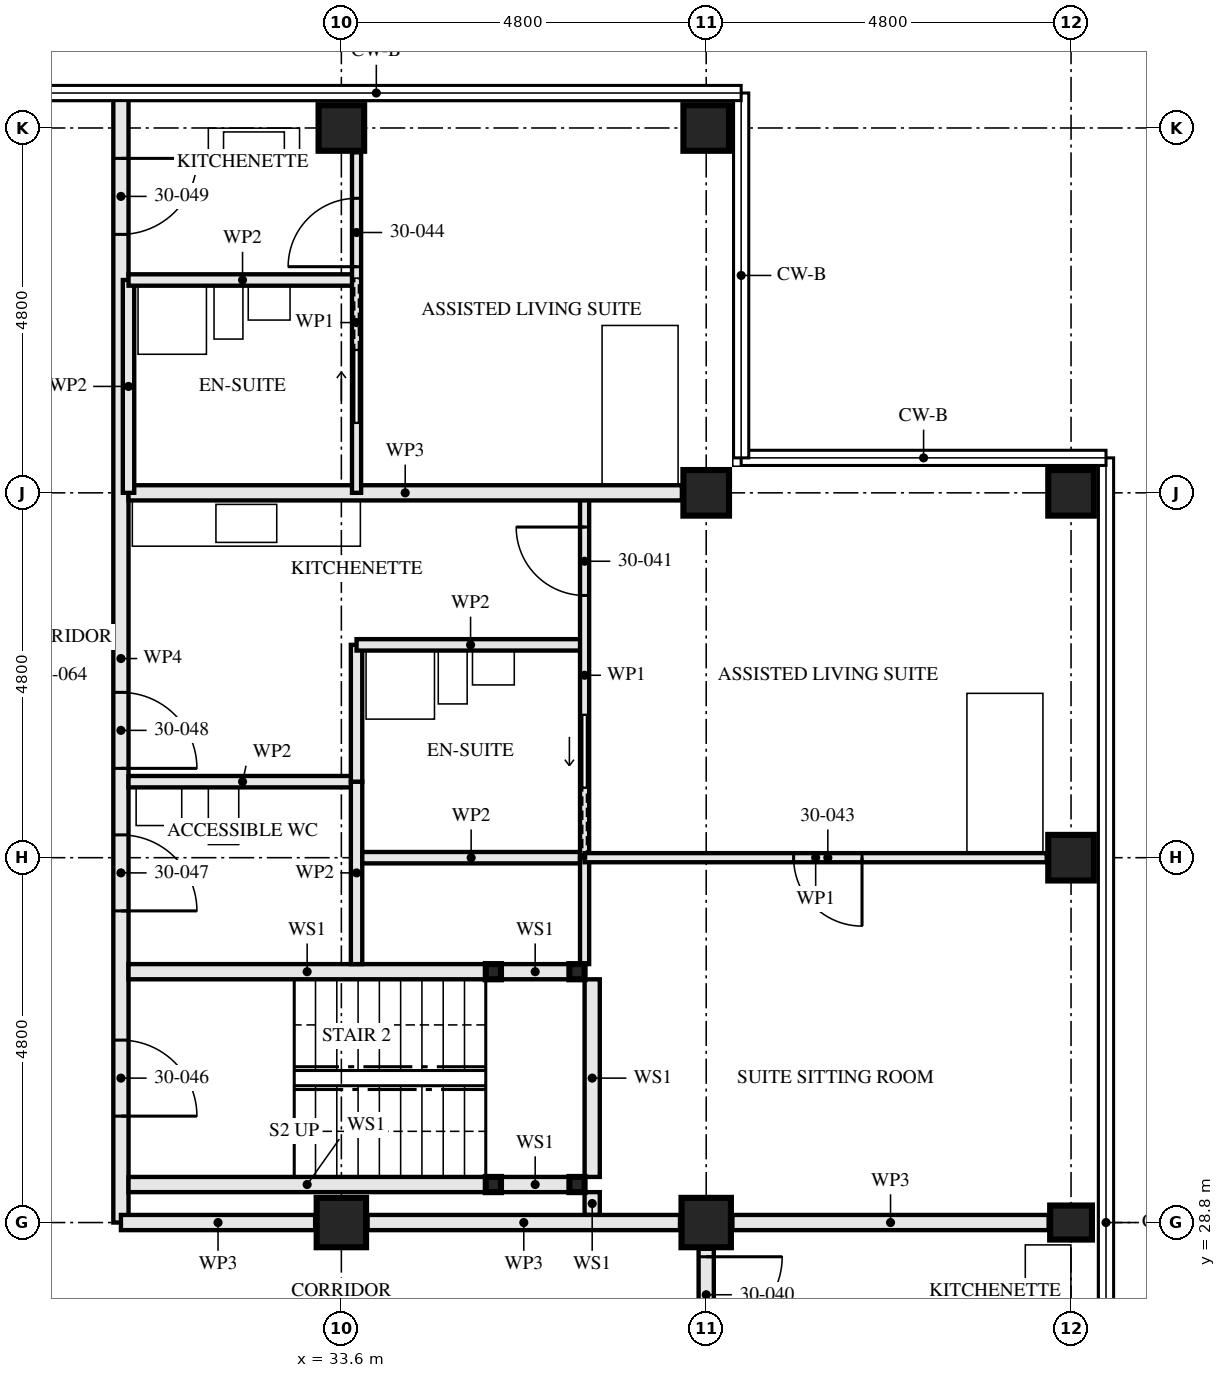
"""IFC4 building model, lengths in metres.
Left out: names, types, materials, properties, quantities, classifications, styles, units other than length and angle.
Written with IfcOpenShell. Run it as: python <this file> out.ifc"""

import sys

from ifc_helpers import new_model, si_unit, direction, frame, frame_2d, origin, origin_2d, place, context, subcontext, project, spatial, rectangle, hollow_rectangle, i_section, extrude, element, fill, save


model = new_model("IFC4")
c1 = context("Model", 3, precision=1e-05, world=origin(), true_north=direction((0.0, 1.0)))
c2 = subcontext(c1, "Body", "Model", "MODEL_VIEW")
j1 = project(units=[si_unit("LENGTHUNIT", "METRE"), si_unit("PLANEANGLEUNIT", "RADIAN")], contexts=[c1])
p1 = place(None, origin())
s1 = spatial("IfcSite", under=j1, at=p1, CompositionType="ELEMENT")
p2 = place(p1, origin())
s2 = spatial("IfcBuilding", under=s1, at=p2, CompositionType="ELEMENT")
p3 = place(p2, frame((0.0, 0.0, 112.0)))
s3 = spatial("IfcBuildingStorey", under=s2, at=p3, CompositionType="ELEMENT", Elevation=112.0)
p4 = place(p3, frame((33.6, 28.8, 0.0), z_axis=(0.0, 0.0, 1.0), x_axis=(0.0, 1.0, 0.0)))
e1 = element("IfcColumn", 1, at=p4, inside=s3, PredefinedType="COLUMN", context=c2, shape_type="SweptSolid", body=[
    extrude(hollow_rectangle(XDim=0.65, YDim=0.65, WallThickness=0.05, at=origin_2d()), origin(), (0.0, 0.0, 1.0), 3.5),
])
p5 = place(p3, frame((33.6, 43.2, 0.0), z_axis=(0.0, 0.0, 1.0), x_axis=(0.0, 1.0, 0.0)))
e2 = element("IfcColumn", 2, at=p5, inside=s3, PredefinedType="COLUMN", context=c2, shape_type="SweptSolid", body=[
    extrude(hollow_rectangle(XDim=0.6, YDim=0.6, WallThickness=0.08, at=origin_2d()), origin(), (0.0, 0.0, 1.0), 3.5),
])
p6 = place(p3, frame((38.4, 28.8, 0.0), z_axis=(0.0, 0.0, 1.0), x_axis=(0.0, 1.0, 0.0)))
e3 = element("IfcColumn", 3, at=p6, inside=s3, PredefinedType="COLUMN", context=c2, shape_type="SweptSolid", body=[
    extrude(hollow_rectangle(XDim=0.65, YDim=0.65, WallThickness=0.05, at=origin_2d()), origin(), (0.0, 0.0, 1.0), 3.5),
])
for number, where, z_axis, x_axis in (
    (4, (38.4, 38.4, 0.0), (0.0, 0.0, 1.0), (0.0, 1.0, 0.0)),
    (5, (38.4, 43.2, 0.0), (0.0, 0.0, 1.0), (0.0, 1.0, 0.0)),
):
    element("IfcColumn", number, at=place(p3, frame(where, z_axis=z_axis, x_axis=x_axis)), inside=s3, PredefinedType="COLUMN", context=c2, shape_type="SweptSolid", body=[
        extrude(hollow_rectangle(XDim=0.6, YDim=0.6, WallThickness=0.08, at=origin_2d()), origin(), (0.0, 0.0, 1.0), 3.5),
    ])
p7 = place(p3, frame((43.2, 28.8, 0.0), z_axis=(0.0, 0.0, 1.0), x_axis=(0.0, 1.0, 0.0)))
e6 = element("IfcColumn", 6, at=p7, inside=s3, PredefinedType="COLUMN", context=c2, shape_type="SweptSolid", body=[
    extrude(i_section(OverallWidth=0.448, OverallDepth=0.55, WebThickness=0.072, FlangeThickness=0.115, FilletRadius=0.015, at=origin_2d()), origin(), (0.0, 0.0, 1.0), 3.5),
])
for number, where, z_axis, x_axis in (
    (7, (43.2, 33.6, 0.0), (0.0, 0.0, 1.0), (1.0, 0.0, 0.0)),
    (8, (43.2, 38.4, 0.0), (0.0, 0.0, 1.0), (0.0, 1.0, 0.0)),
):
    element("IfcColumn", number, at=place(p3, frame(where, z_axis=z_axis, x_axis=x_axis)), inside=s3, PredefinedType="COLUMN", context=c2, shape_type="SweptSolid", body=[
        extrude(hollow_rectangle(XDim=0.6, YDim=0.6, WallThickness=0.08, at=origin_2d()), origin(), (0.0, 0.0, 1.0), 3.5),
    ])
for number, where, z_axis, x_axis in (
    (9, (36.7, 29.3, 0.0), (0.0, 0.0, 1.0), (1.0, 0.0, 0.0)),
    (10, (36.7, 32.1, 0.0), (0.0, 0.0, 1.0), (1.0, 0.0, 0.0)),
    (11, (35.6, 29.3, 0.0), (0.0, 0.0, 1.0), (1.0, 0.0, 0.0)),
    (12, (35.6, 32.1, 0.0), (0.0, 0.0, 1.0), (1.0, 0.0, 0.0)),
):
    element("IfcColumn", number, at=place(p3, frame(where, z_axis=z_axis, x_axis=x_axis)), inside=s3, PredefinedType="COLUMN", context=c2, shape_type="SweptSolid", body=[
        extrude(hollow_rectangle(XDim=0.2, YDim=0.2, WallThickness=0.008, at=origin_2d()), origin(), (0.0, 0.0, 1.0), 3.33),
    ])
p8 = place(p3, frame((38.4, 26.8, 0.0), z_axis=(0.0, 0.0, 1.0), x_axis=(0.0, 1.0, 0.0)))
e13 = element("IfcWall", 13, at=p8, inside=s3, PredefinedType="PARTITIONING", context=c2, shape_type="SweptSolid", body=[
    extrude(rectangle(XDim=1.655, YDim=0.2, at=frame_2d((0.828, 0.0))), origin(), (0.0, 0.0, 1.0), 3.33),
])
p9 = place(p8, frame((0.55, 0.0, 0.0)))
e14 = element("IfcOpeningElement", 14, at=p9, cuts=e13, PredefinedType="OPENING", context=c2, shape_type="SweptSolid", body=[
    extrude(rectangle(XDim=1.0, YDim=2.1, at=frame_2d((0.5, 1.05))), frame((0.0, 0.111, 0.0), z_axis=(0.0, -1.0, 0.0), x_axis=(1.0, 0.0, 0.0)), (0.0, 0.0, 1.0), 0.221),
])
p10 = place(p3, frame((36.6, 29.3, 0.0), z_axis=(0.0, 0.0, 1.0), x_axis=(-1.0, 0.0, 0.0)))
e15 = element("IfcWall", 15, at=p10, inside=s3, PredefinedType="SOLIDWALL", context=c2, shape_type="SweptSolid", body=[
    extrude(rectangle(XDim=0.9, YDim=0.2, at=frame_2d((0.45, 0.0))), origin(), (0.0, 0.0, 1.0), 2.99),
])
p11 = place(p3, frame((35.5, 29.3, 0.0), z_axis=(0.0, 0.0, 1.0), x_axis=(-1.0, 0.0, 0.0)))
e16 = element("IfcWall", 16, at=p11, inside=s3, PredefinedType="SOLIDWALL", context=c2, shape_type="SweptSolid", body=[
    extrude(rectangle(XDim=4.7, YDim=0.2, at=frame_2d((2.35, 0.0))), origin(), (0.0, 0.0, 1.0), 2.99),
])
p12 = place(p3, frame((36.6, 32.1, 0.0), z_axis=(0.0, 0.0, 1.0), x_axis=(-1.0, 0.0, 0.0)))
e17 = element("IfcWall", 17, at=p12, inside=s3, PredefinedType="SOLIDWALL", context=c2, shape_type="SweptSolid", body=[
    extrude(rectangle(XDim=0.9, YDim=0.2, at=frame_2d((0.45, 0.0))), origin(), (0.0, 0.0, 1.0), 2.99),
])
p13 = place(p3, frame((35.5, 32.1, 0.0), z_axis=(0.0, 0.0, 1.0), x_axis=(-1.0, 0.0, 0.0)))
e18 = element("IfcWall", 18, at=p13, inside=s3, PredefinedType="SOLIDWALL", context=c2, shape_type="SweptSolid", body=[
    extrude(rectangle(XDim=4.7, YDim=0.2, at=frame_2d((2.35, 0.0))), origin(), (0.0, 0.0, 1.0), 2.99),
])
p14 = place(p3, frame((36.9, 28.9, 0.0), z_axis=(0.0, 0.0, 1.0), x_axis=(0.0, 1.0, 0.0)))
e19 = element("IfcWall", 19, at=p14, inside=s3, PredefinedType="SOLIDWALL", context=c2, shape_type="SweptSolid", body=[
    extrude(rectangle(XDim=0.3, YDim=0.2, at=frame_2d((0.15, 0.0))), origin(), (0.0, 0.0, 1.0), 3.33),
])
p15 = place(p3, frame((36.9, 29.4, 0.0), z_axis=(0.0, 0.0, 1.0), x_axis=(0.0, 1.0, 0.0)))
e20 = element("IfcWall", 20, at=p15, inside=s3, PredefinedType="SOLIDWALL", context=c2, shape_type="SweptSolid", body=[
    extrude(rectangle(XDim=2.6, YDim=0.2, at=frame_2d((1.3, 0.0))), origin(), (0.0, 0.0, 1.0), 3.33),
])
p16 = place(p3, frame((33.8, 32.2, 0.0), z_axis=(0.0, 0.0, 1.0), x_axis=(0.0, 1.0, 0.0)))
e21 = element("IfcWall", 21, at=p16, inside=s3, PredefinedType="PARTITIONING", context=c2, shape_type="SweptSolid", body=[
    extrude(rectangle(XDim=2.4, YDim=0.15, at=frame_2d((1.2, 0.0))), origin(), (0.0, 0.0, 1.0), 2.55),
])
for number, where, z_axis, x_axis in (
    (22, (33.8, 34.6, 0.0), (0.0, 0.0, 1.0), (-1.0, 0.0, 0.0)),
    (23, (36.8, 36.4, 0.0), (0.0, 0.0, 1.0), (-1.0, 0.0, 0.0)),
):
    element("IfcWall", number, at=place(p3, frame(where, z_axis=z_axis, x_axis=x_axis)), inside=s3, PredefinedType="PARTITIONING", context=c2, shape_type="SweptSolid", body=[
        extrude(rectangle(XDim=3.0, YDim=0.15, at=frame_2d((1.5, 0.0))), origin(), (0.0, 0.0, 1.0), 3.33),
    ])
p17 = place(p3, frame((33.8, 34.6, 0.0), z_axis=(0.0, 0.0, 1.0), x_axis=(0.0, 1.0, 0.0)))
e24 = element("IfcWall", 24, at=p17, inside=s3, PredefinedType="PARTITIONING", context=c2, shape_type="SweptSolid", body=[
    extrude(rectangle(XDim=1.8, YDim=0.15, at=frame_2d((0.9, 0.0))), origin(), (0.0, 0.0, 1.0), 3.33),
])
p18 = place(p3, frame((36.8, 32.2, 0.0), z_axis=(0.0, 0.0, 1.0), x_axis=(0.0, 1.0, 0.0)))
e25 = element("IfcWall", 25, at=p18, inside=s3, PredefinedType="PARTITIONING", context=c2, shape_type="SweptSolid", body=[
    extrude(rectangle(XDim=1.4, YDim=0.12, at=frame_2d((0.7, 0.0))), origin(), (0.0, 0.0, 1.0), 3.33),
])
p19 = place(p3, frame((36.8, 33.6, 0.0), z_axis=(0.0, 0.0, 1.0), x_axis=(0.0, 1.0, 0.0)))
e26 = element("IfcWall", 26, at=p19, inside=s3, PredefinedType="PARTITIONING", context=c2, shape_type="SweptSolid", body=[
    extrude(rectangle(XDim=4.8, YDim=0.12, at=frame_2d((2.4, 0.0))), origin(), (0.0, 0.0, 1.0), 3.33),
])
p20 = place(p19, frame((3.45, 0.0, 0.0)))
e27 = element("IfcOpeningElement", 27, at=p20, cuts=e26, PredefinedType="OPENING", context=c2, shape_type="SweptSolid", body=[
    extrude(rectangle(XDim=0.9, YDim=2.1, at=frame_2d((0.45, 1.05))), frame((0.0, 0.071, 0.0), z_axis=(0.0, -1.0, 0.0), x_axis=(1.0, 0.0, 0.0)), (0.0, 0.0, 1.0), 0.141),
])
p21 = place(p19, frame((0.925, 0.0, 0.0)))
e28 = element("IfcOpeningElement", 28, at=p21, cuts=e26, PredefinedType="OPENING", context=c2, shape_type="SweptSolid", body=[
    extrude(rectangle(XDim=0.95, YDim=2.1, at=frame_2d((0.475, 1.05))), frame((0.0, 0.071, 0.0), z_axis=(0.0, -1.0, 0.0), x_axis=(1.0, 0.0, 0.0)), (0.0, 0.0, 1.0), 0.141),
])
p22 = place(p3, frame((42.88, 33.6, 0.0), z_axis=(0.0, 0.0, 1.0), x_axis=(-1.0, 0.0, 0.0)))
e29 = element("IfcWall", 29, at=p22, inside=s3, PredefinedType="PARTITIONING", context=c2, shape_type="SweptSolid", body=[
    extrude(rectangle(XDim=6.08, YDim=0.12, at=frame_2d((3.04, 0.0))), origin(), (0.0, 0.0, 1.0), 2.55),
])
p23 = place(p22, frame((2.43, 0.0, 0.0)))
e30 = element("IfcOpeningElement", 30, at=p23, cuts=e29, PredefinedType="OPENING", context=c2, shape_type="SweptSolid", body=[
    extrude(rectangle(XDim=0.9, YDim=2.1, at=frame_2d((0.45, 1.05))), frame((0.0, 0.071, 0.0), z_axis=(0.0, -1.0, 0.0), x_axis=(1.0, 0.0, 0.0)), (0.0, 0.0, 1.0), 0.141),
])
p24 = place(p3, frame((38.08, 38.4, 0.0), z_axis=(0.0, 0.0, 1.0), x_axis=(-1.0, 0.0, 0.0)))
e31 = element("IfcWall", 31, at=p24, inside=s3, PredefinedType="PARTITIONING", context=c2, shape_type="SweptSolid", body=[
    extrude(rectangle(XDim=7.28, YDim=0.2, at=frame_2d((3.64, 0.0))), origin(), (0.0, 0.0, 1.0), 2.55),
])
p25 = place(p3, frame((33.8, 41.2, 0.0), z_axis=(0.0, 0.0, 1.0), x_axis=(-1.0, 0.0, 0.0)))
e32 = element("IfcWall", 32, at=p25, inside=s3, PredefinedType="PARTITIONING", context=c2, shape_type="SweptSolid", body=[
    extrude(rectangle(XDim=3.0, YDim=0.15, at=frame_2d((1.5, 0.0))), origin(), (0.0, 0.0, 1.0), 3.33),
])
p26 = place(p3, frame((30.8, 38.4, 0.0), z_axis=(0.0, 0.0, 1.0), x_axis=(0.0, 1.0, 0.0)))
e33 = element("IfcWall", 33, at=p26, inside=s3, PredefinedType="PARTITIONING", context=c2, shape_type="SweptSolid", body=[
    extrude(rectangle(XDim=2.8, YDim=0.15, at=frame_2d((1.4, 0.0))), origin(), (0.0, 0.0, 1.0), 3.33),
])
p27 = place(p3, frame((33.8, 38.4, 0.0), z_axis=(0.0, 0.0, 1.0), x_axis=(0.0, 1.0, 0.0)))
e34 = element("IfcWall", 34, at=p27, inside=s3, PredefinedType="PARTITIONING", context=c2, shape_type="SweptSolid", body=[
    extrude(rectangle(XDim=4.48, YDim=0.12, at=frame_2d((2.24, 0.0))), origin(), (0.0, 0.0, 1.0), 3.33),
])
p28 = place(p27, frame((2.975, 0.0, 0.0)))
e35 = element("IfcOpeningElement", 35, at=p28, cuts=e34, PredefinedType="OPENING", context=c2, shape_type="SweptSolid", body=[
    extrude(rectangle(XDim=0.9, YDim=2.1, at=frame_2d((0.45, 1.05))), frame((0.0, 0.071, 0.0), z_axis=(0.0, -1.0, 0.0), x_axis=(1.0, 0.0, 0.0)), (0.0, 0.0, 1.0), 0.141),
])
p29 = place(p27, frame((0.925, 0.0, 0.0)))
e36 = element("IfcOpeningElement", 36, at=p29, cuts=e34, PredefinedType="OPENING", context=c2, shape_type="SweptSolid", body=[
    extrude(rectangle(XDim=0.95, YDim=2.1, at=frame_2d((0.475, 1.05))), frame((0.0, 0.071, 0.0), z_axis=(0.0, -1.0, 0.0), x_axis=(1.0, 0.0, 0.0)), (0.0, 0.0, 1.0), 0.141),
])
p30 = place(p3, frame((30.7, 28.8, 0.0), z_axis=(0.0, 0.0, 1.0), x_axis=(0.0, 1.0, 0.0)))
e37 = element("IfcWall", 37, at=p30, inside=s3, PredefinedType="PARTITIONING", context=c2, shape_type="SweptSolid", body=[
    extrude(rectangle(XDim=14.84, YDim=0.2, at=frame_2d((7.42, 0.0))), origin(), (0.0, 0.0, 1.0), 2.32),
])
p31 = place(p30, frame((1.4, 0.0, 0.0)))
e38 = element("IfcOpeningElement", 38, at=p31, cuts=e37, PredefinedType="OPENING", context=c2, shape_type="SweptSolid", body=[
    extrude(rectangle(XDim=1.0, YDim=2.1, at=frame_2d((0.5, 1.05))), frame((0.0, 0.111, 0.0), z_axis=(0.0, -1.0, 0.0), x_axis=(1.0, 0.0, 0.0)), (0.0, 0.0, 1.0), 0.221),
])
p32 = place(p30, frame((4.1, 0.0, 0.0)))
e39 = element("IfcOpeningElement", 39, at=p32, cuts=e37, PredefinedType="OPENING", context=c2, shape_type="SweptSolid", body=[
    extrude(rectangle(XDim=1.0, YDim=2.1, at=frame_2d((0.5, 1.05))), frame((0.0, 0.111, 0.0), z_axis=(0.0, -1.0, 0.0), x_axis=(1.0, 0.0, 0.0)), (0.0, 0.0, 1.0), 0.221),
])
p33 = place(p30, frame((5.975, 0.0, 0.0)))
e40 = element("IfcOpeningElement", 40, at=p33, cuts=e37, PredefinedType="OPENING", context=c2, shape_type="SweptSolid", body=[
    extrude(rectangle(XDim=1.0, YDim=2.1, at=frame_2d((0.5, 1.05))), frame((0.0, 0.111, 0.0), z_axis=(0.0, -1.0, 0.0), x_axis=(1.0, 0.0, 0.0)), (0.0, 0.0, 1.0), 0.221),
])
p34 = place(p30, frame((13.0, 0.0, 0.0)))
e41 = element("IfcOpeningElement", 41, at=p34, cuts=e37, PredefinedType="OPENING", context=c2, shape_type="SweptSolid", body=[
    extrude(rectangle(XDim=1.0, YDim=2.1, at=frame_2d((0.5, 1.05))), frame((0.0, 0.111, 0.0), z_axis=(0.0, -1.0, 0.0), x_axis=(1.0, 0.0, 0.0)), (0.0, 0.0, 1.0), 0.221),
])
p35 = place(p3, frame((42.905, 28.8, 0.0), z_axis=(0.0, 0.0, 1.0), x_axis=(-1.0, 0.0, 0.0)))
e42 = element("IfcWall", 42, at=p35, inside=s3, PredefinedType="PARTITIONING", context=c2, shape_type="SweptSolid", body=[
    extrude(rectangle(XDim=4.16, YDim=0.2, at=frame_2d((2.08, 0.0))), origin(), (0.0, 0.0, 1.0), 2.32),
])
p36 = place(p3, frame((38.055, 28.8, 0.0), z_axis=(0.0, 0.0, 1.0), x_axis=(-1.0, 0.0, 0.0)))
e43 = element("IfcWall", 43, at=p36, inside=s3, PredefinedType="PARTITIONING", context=c2, shape_type="SweptSolid", body=[
    extrude(rectangle(XDim=4.11, YDim=0.2, at=frame_2d((2.055, 0.0))), origin(), (0.0, 0.0, 1.0), 2.32),
])
p37 = place(p3, frame((33.255, 28.8, 0.0), z_axis=(0.0, 0.0, 1.0), x_axis=(-1.0, 0.0, 0.0)))
e44 = element("IfcWall", 44, at=p37, inside=s3, PredefinedType="PARTITIONING", context=c2, shape_type="SweptSolid", body=[
    extrude(rectangle(XDim=2.555, YDim=0.2, at=frame_2d((1.277, 0.0))), origin(), (0.0, 0.0, 1.0), 2.32),
])
p38 = place(p3, frame((36.74, 33.6, 0.0), z_axis=(0.0, 0.0, 1.0), x_axis=(-1.0, 0.0, 0.0)))
e45 = element("IfcWall", 45, at=p38, inside=s3, PredefinedType="PARTITIONING", context=c2, shape_type="SweptSolid", body=[
    extrude(rectangle(XDim=2.865, YDim=0.15, at=frame_2d((1.433, 0.0))), origin(), (0.0, 0.0, 1.0), 2.55),
])
p39 = place(p9, frame((1.0, 0.0, 0.0), z_axis=(0.0, 0.0, 1.0), x_axis=(-1.0, 0.0, 0.0)))
e46 = element("IfcDoor", 46, at=p39, inside=s3, OperationType="SINGLE_SWING_RIGHT", PredefinedType="DOOR", context=c2, shape_type="SweptSolid", body=[
    extrude(rectangle(XDim=1.0, YDim=2.1, at=frame_2d((0.5, 1.05))), frame((0.0, 0.027, 0.0), z_axis=(0.0, -1.0, 0.0), x_axis=(1.0, 0.0, 0.0)), (0.0, 0.0, 1.0), 0.054),
])
fill(e14, e46)
p40 = place(p20, origin())
e47 = element("IfcDoor", 47, at=p40, inside=s3, OperationType="SINGLE_SWING_LEFT", PredefinedType="DOOR", context=c2, shape_type="SweptSolid", body=[
    extrude(rectangle(XDim=0.9, YDim=2.1, at=frame_2d((0.45, 1.05))), frame((0.0, 0.022, 0.0), z_axis=(0.0, -1.0, 0.0), x_axis=(1.0, 0.0, 0.0)), (0.0, 0.0, 1.0), 0.044),
])
fill(e27, e47)
p41 = place(p21, origin())
e48 = element("IfcDoor", 48, at=p41, inside=s3, OperationType="SLIDING_TO_RIGHT", PredefinedType="DOOR", context=c2, shape_type="SweptSolid", body=[
    extrude(rectangle(XDim=0.95, YDim=2.1, at=frame_2d((0.475, 1.05))), frame((0.0, 0.022, 0.0), z_axis=(0.0, -1.0, 0.0), x_axis=(1.0, 0.0, 0.0)), (0.0, 0.0, 1.0), 0.044),
])
fill(e28, e48)
p42 = place(p23, origin())
e49 = element("IfcDoor", 49, at=p42, inside=s3, OperationType="SINGLE_SWING_RIGHT", PredefinedType="DOOR", context=c2, shape_type="SweptSolid", body=[
    extrude(rectangle(XDim=0.9, YDim=2.1, at=frame_2d((0.45, 1.05))), frame((0.0, 0.022, 0.0), z_axis=(0.0, -1.0, 0.0), x_axis=(1.0, 0.0, 0.0)), (0.0, 0.0, 1.0), 0.044),
])
fill(e30, e49)
p43 = place(p28, origin())
e50 = element("IfcDoor", 50, at=p43, inside=s3, OperationType="SINGLE_SWING_RIGHT", PredefinedType="DOOR", context=c2, shape_type="SweptSolid", body=[
    extrude(rectangle(XDim=0.9, YDim=2.1, at=frame_2d((0.45, 1.05))), frame((0.0, 0.022, 0.0), z_axis=(0.0, -1.0, 0.0), x_axis=(1.0, 0.0, 0.0)), (0.0, 0.0, 1.0), 0.044),
])
fill(e35, e50)
p44 = place(p29, origin())
e51 = element("IfcDoor", 51, at=p44, inside=s3, OperationType="SLIDING_TO_LEFT", PredefinedType="DOOR", context=c2, shape_type="SweptSolid", body=[
    extrude(rectangle(XDim=0.95, YDim=2.1, at=frame_2d((0.475, 1.05))), frame((0.0, 0.022, 0.0), z_axis=(0.0, -1.0, 0.0), x_axis=(1.0, 0.0, 0.0)), (0.0, 0.0, 1.0), 0.044),
])
fill(e36, e51)
p45 = place(p31, frame((1.0, 0.0, 0.0), z_axis=(0.0, 0.0, 1.0), x_axis=(-1.0, 0.0, 0.0)))
e52 = element("IfcDoor", 52, at=p45, inside=s3, OperationType="SINGLE_SWING_LEFT", PredefinedType="DOOR", context=c2, shape_type="SweptSolid", body=[
    extrude(rectangle(XDim=1.0, YDim=2.1, at=frame_2d((0.5, 1.05))), frame((0.0, 0.032, 0.0), z_axis=(0.0, -1.0, 0.0), x_axis=(1.0, 0.0, 0.0)), (0.0, 0.0, 1.0), 0.064),
])
fill(e38, e52)
p46 = place(p32, frame((1.0, 0.0, 0.0), z_axis=(0.0, 0.0, 1.0), x_axis=(-1.0, 0.0, 0.0)))
e53 = element("IfcDoor", 53, at=p46, inside=s3, OperationType="SINGLE_SWING_LEFT", PredefinedType="DOOR", context=c2, shape_type="SweptSolid", body=[
    extrude(rectangle(XDim=1.0, YDim=2.1, at=frame_2d((0.5, 1.05))), frame((0.0, 0.027, 0.0), z_axis=(0.0, -1.0, 0.0), x_axis=(1.0, 0.0, 0.0)), (0.0, 0.0, 1.0), 0.054),
])
fill(e39, e53)
p47 = place(p33, frame((1.0, 0.0, 0.0), z_axis=(0.0, 0.0, 1.0), x_axis=(-1.0, 0.0, 0.0)))
e54 = element("IfcDoor", 54, at=p47, inside=s3, OperationType="SINGLE_SWING_LEFT", PredefinedType="DOOR", context=c2, shape_type="SweptSolid", body=[
    extrude(rectangle(XDim=1.0, YDim=2.1, at=frame_2d((0.5, 1.05))), frame((0.0, 0.027, 0.0), z_axis=(0.0, -1.0, 0.0), x_axis=(1.0, 0.0, 0.0)), (0.0, 0.0, 1.0), 0.054),
])
fill(e40, e54)
p48 = place(p34, frame((1.0, 0.0, 0.0), z_axis=(0.0, 0.0, 1.0), x_axis=(-1.0, 0.0, 0.0)))
e55 = element("IfcDoor", 55, at=p48, inside=s3, OperationType="SINGLE_SWING_RIGHT", PredefinedType="DOOR", context=c2, shape_type="SweptSolid", body=[
    extrude(rectangle(XDim=1.0, YDim=2.1, at=frame_2d((0.5, 1.05))), frame((0.0, 0.027, 0.0), z_axis=(0.0, -1.0, 0.0), x_axis=(1.0, 0.0, 0.0)), (0.0, 0.0, 1.0), 0.054),
])
fill(e41, e55)
save(model, sys.argv[1])
